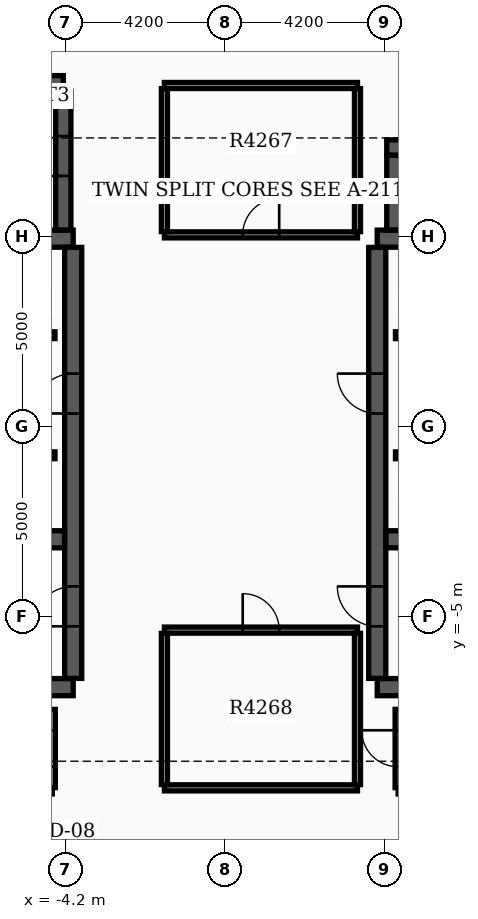
"""IFC4 building model, lengths in metres.
Left out: names, types, materials, properties, quantities, classifications, styles, units other than length and angle.
Written with IfcOpenShell. Run it as: python <this file> out.ifc"""

import sys

from ifc_helpers import new_model, si_unit, direction, frame, frame_2d, origin, place, context, subcontext, project, spatial, rectangle, extrude, element, fill, save


model = new_model("IFC4")
c1 = context("Model", 3, precision=1e-05, world=origin(), true_north=direction((0.0, 1.0)))
c2 = subcontext(c1, "Body", "Model", "MODEL_VIEW")
j1 = project(units=[si_unit("LENGTHUNIT", "METRE"), si_unit("PLANEANGLEUNIT", "RADIAN")], contexts=[c1])
p1 = place(None, origin())
s1 = spatial("IfcSite", under=j1, at=p1, CompositionType="ELEMENT")
p2 = place(p1, origin())
s2 = spatial("IfcBuilding", under=s1, at=p2, CompositionType="ELEMENT")
p3 = place(p2, frame((0.0, 0.0, 269.4)))
s3 = spatial("IfcBuildingStorey", under=s2, at=p3, CompositionType="ELEMENT", Elevation=269.4)
for number, where, z_axis, x_axis in (
    (1, (-12.4, -6.85, 0.0), (0.0, 0.0, 1.0), (1.0, 0.0, 0.0)),
    (2, (-12.4, 4.95, 0.0), (0.0, 0.0, 1.0), (1.0, 0.0, 0.0)),
):
    element("IfcWall", number, at=place(p3, frame(where, z_axis=z_axis, x_axis=x_axis)), inside=s3, PredefinedType="SHEAR", context=c2, shape_type="SweptSolid", body=[
        extrude(rectangle(XDim=8.4, YDim=0.45, at=frame_2d((4.2, 0.0))), origin(), (0.0, 0.0, 1.0), 3.7),
    ])
p4 = place(p3, frame((-4.0, -6.62, 0.0), z_axis=(0.0, 0.0, 1.0), x_axis=(0.0, 1.0, 0.0)))
e3 = element("IfcWall", 3, at=p4, inside=s3, PredefinedType="SHEAR", context=c2, shape_type="SweptSolid", body=[
    extrude(rectangle(XDim=11.34, YDim=0.45, at=frame_2d((5.67, 0.0))), origin(), (0.0, 0.0, 1.0), 3.7),
])
p5 = place(p4, frame((1.37, 0.0, 0.0)))
e4 = element("IfcOpeningElement", 4, at=p5, cuts=e3, PredefinedType="OPENING", context=c2, shape_type="SweptSolid", body=[
    extrude(rectangle(XDim=1.05, YDim=2.15, at=frame_2d((0.525, 1.075))), frame((0.0, 0.235, 0.0), z_axis=(0.0, -1.0, 0.0), x_axis=(1.0, 0.0, 0.0)), (0.0, 0.0, 1.0), 0.47),
])
p6 = place(p4, frame((6.97, 0.0, 0.0)))
e5 = element("IfcOpeningElement", 5, at=p6, cuts=e3, PredefinedType="OPENING", context=c2, shape_type="SweptSolid", body=[
    extrude(rectangle(XDim=1.05, YDim=2.15, at=frame_2d((0.525, 1.075))), frame((0.0, 0.235, 0.0), z_axis=(0.0, -1.0, 0.0), x_axis=(1.0, 0.0, 0.0)), (0.0, 0.0, 1.0), 0.47),
])
p7 = place(p3, frame((-12.17, -2.96, 0.0), z_axis=(0.0, 0.0, 1.0), x_axis=(1.0, 0.0, 0.0)))
e6 = element("IfcWall", 6, at=p7, inside=s3, PredefinedType="SHEAR", context=c2, shape_type="SweptSolid", body=[
    extrude(rectangle(XDim=7.94, YDim=0.45, at=frame_2d((3.97, 0.0))), origin(), (0.0, 0.0, 1.0), 3.7),
])
for number, where, z_axis, x_axis in (
    (7, (4.0, -6.85, 0.0), (0.0, 0.0, 1.0), (1.0, 0.0, 0.0)),
    (8, (4.0, 4.95, 0.0), (0.0, 0.0, 1.0), (1.0, 0.0, 0.0)),
):
    element("IfcWall", number, at=place(p3, frame(where, z_axis=z_axis, x_axis=x_axis)), inside=s3, PredefinedType="SHEAR", context=c2, shape_type="SweptSolid", body=[
        extrude(rectangle(XDim=8.4, YDim=0.45, at=frame_2d((4.2, 0.0))), origin(), (0.0, 0.0, 1.0), 3.7),
    ])
p8 = place(p3, frame((4.0, -6.62, 0.0), z_axis=(0.0, 0.0, 1.0), x_axis=(0.0, 1.0, 0.0)))
e9 = element("IfcWall", 9, at=p8, inside=s3, PredefinedType="SHEAR", context=c2, shape_type="SweptSolid", body=[
    extrude(rectangle(XDim=11.34, YDim=0.45, at=frame_2d((5.67, 0.0))), origin(), (0.0, 0.0, 1.0), 3.7),
])
p9 = place(p8, frame((1.37, 0.0, 0.0)))
e10 = element("IfcOpeningElement", 10, at=p9, cuts=e9, PredefinedType="OPENING", context=c2, shape_type="SweptSolid", body=[
    extrude(rectangle(XDim=1.05, YDim=2.15, at=frame_2d((0.525, 1.075))), frame((0.0, 0.235, 0.0), z_axis=(0.0, -1.0, 0.0), x_axis=(1.0, 0.0, 0.0)), (0.0, 0.0, 1.0), 0.47),
])
p10 = place(p8, frame((6.97, 0.0, 0.0)))
e11 = element("IfcOpeningElement", 11, at=p10, cuts=e9, PredefinedType="OPENING", context=c2, shape_type="SweptSolid", body=[
    extrude(rectangle(XDim=1.05, YDim=2.15, at=frame_2d((0.525, 1.075))), frame((0.0, 0.235, 0.0), z_axis=(0.0, -1.0, 0.0), x_axis=(1.0, 0.0, 0.0)), (0.0, 0.0, 1.0), 0.47),
])
p11 = place(p3, frame((4.23, -2.96, 0.0), z_axis=(0.0, 0.0, 1.0), x_axis=(1.0, 0.0, 0.0)))
e12 = element("IfcWall", 12, at=p11, inside=s3, PredefinedType="SHEAR", context=c2, shape_type="SweptSolid", body=[
    extrude(rectangle(XDim=7.94, YDim=0.45, at=frame_2d((3.97, 0.0))), origin(), (0.0, 0.0, 1.0), 3.7),
])
p12 = place(p3, frame((-12.22, 9.04, 0.0), z_axis=(0.0, 0.0, 1.0), x_axis=(1.0, 0.0, 0.0)))
e13 = element("IfcWall", 13, at=p12, inside=s3, PredefinedType="SHEAR", context=c2, shape_type="SweptSolid", body=[
    extrude(rectangle(XDim=7.96, YDim=0.4, at=frame_2d((3.98, 0.0))), origin(), (0.0, 0.0, 1.0), 3.7),
])
p13 = place(p3, frame((-4.26, 5.18, 0.0), z_axis=(0.0, 0.0, 1.0), x_axis=(0.0, 1.0, 0.0)))
e14 = element("IfcWall", 14, at=p13, inside=s3, PredefinedType="SHEAR", context=c2, shape_type="SweptSolid", body=[
    extrude(rectangle(XDim=3.655, YDim=0.4, at=frame_2d((1.828, 0.0))), origin(), (0.0, 0.0, 1.0), 3.7),
])
p14 = place(p13, frame((1.42, 0.0, 0.0)))
e15 = element("IfcOpeningElement", 15, at=p14, cuts=e14, PredefinedType="OPENING", context=c2, shape_type="SweptSolid", body=[
    extrude(rectangle(XDim=1.05, YDim=2.15, at=frame_2d((0.525, 1.075))), frame((0.0, 0.21, 0.0), z_axis=(0.0, -1.0, 0.0), x_axis=(1.0, 0.0, 0.0)), (0.0, 0.0, 1.0), 0.42),
])
p15 = place(p3, frame((4.45, 5.18, 0.0), z_axis=(0.0, 0.0, 1.0), x_axis=(0.0, 1.0, 0.0)))
e16 = element("IfcWall", 16, at=p15, inside=s3, PredefinedType="SHEAR", context=c2, shape_type="SweptSolid", body=[
    extrude(rectangle(XDim=1.96, YDim=0.4, at=frame_2d((0.98, 0.0))), origin(), (0.0, 0.0, 1.0), 3.7),
])
p16 = place(p3, frame((4.25, 7.35, 0.0), z_axis=(0.0, 0.0, 1.0), x_axis=(1.0, 0.0, 0.0)))
e17 = element("IfcWall", 17, at=p16, inside=s3, PredefinedType="SHEAR", context=c2, shape_type="SweptSolid", body=[
    extrude(rectangle(XDim=5.4, YDim=0.4, at=frame_2d((2.7, 0.0))), origin(), (0.0, 0.0, 1.0), 3.7),
])
p17 = place(p3, frame((-11.9, 2.41, 0.0), z_axis=(0.0, 0.0, 1.0), x_axis=(1.0, 0.0, 0.0)))
e18 = element("IfcWall", 18, at=p17, inside=s3, PredefinedType="SOLIDWALL", context=c2, shape_type="SweptSolid", body=[
    extrude(rectangle(XDim=7.42, YDim=0.18, at=frame_2d((3.71, 0.0))), origin(), (0.0, 0.0, 1.0), 3.17),
])
p18 = place(p17, frame((0.55, 0.0, 0.0)))
e19 = element("IfcOpeningElement", 19, at=p18, cuts=e18, PredefinedType="OPENING", context=c2, shape_type="SweptSolid", body=[
    extrude(rectangle(XDim=1.1, YDim=2.15, at=frame_2d((0.55, 1.075))), frame((0.0, 0.1, 0.0), z_axis=(0.0, -1.0, 0.0), x_axis=(1.0, 0.0, 0.0)), (0.0, 0.0, 1.0), 0.2),
])
p19 = place(p17, frame((4.9, 0.0, 0.0)))
e20 = element("IfcOpeningElement", 20, at=p19, cuts=e18, PredefinedType="OPENING", context=c2, shape_type="SweptSolid", body=[
    extrude(rectangle(XDim=0.88, YDim=2.1, at=frame_2d((0.44, 1.05))), frame((0.0, 0.1, 0.0), z_axis=(0.0, -1.0, 0.0), x_axis=(1.0, 0.0, 0.0)), (0.0, 0.0, 1.0), 0.2),
])
p20 = place(p3, frame((4.48, 2.41, 0.0), z_axis=(0.0, 0.0, 1.0), x_axis=(1.0, 0.0, 0.0)))
e21 = element("IfcWall", 21, at=p20, inside=s3, PredefinedType="SOLIDWALL", context=c2, shape_type="SweptSolid", body=[
    extrude(rectangle(XDim=7.42, YDim=0.18, at=frame_2d((3.71, 0.0))), origin(), (0.0, 0.0, 1.0), 3.17),
])
p21 = place(p20, frame((5.67, 0.0, 0.0)))
e22 = element("IfcOpeningElement", 22, at=p21, cuts=e21, PredefinedType="OPENING", context=c2, shape_type="SweptSolid", body=[
    extrude(rectangle(XDim=1.1, YDim=2.15, at=frame_2d((0.55, 1.075))), frame((0.0, 0.1, 0.0), z_axis=(0.0, -1.0, 0.0), x_axis=(1.0, 0.0, 0.0)), (0.0, 0.0, 1.0), 0.2),
])
p22 = place(p20, frame((1.6, 0.0, 0.0)))
e23 = element("IfcOpeningElement", 23, at=p22, cuts=e21, PredefinedType="OPENING", context=c2, shape_type="SweptSolid", body=[
    extrude(rectangle(XDim=0.88, YDim=2.1, at=frame_2d((0.44, 1.05))), frame((0.0, 0.1, 0.0), z_axis=(0.0, -1.0, 0.0), x_axis=(1.0, 0.0, 0.0)), (0.0, 0.0, 1.0), 0.2),
])
p23 = place(p3, frame((-11.9, -0.75, 0.0), z_axis=(0.0, 0.0, 1.0), x_axis=(1.0, 0.0, 0.0)))
e24 = element("IfcWall", 24, at=p23, inside=s3, PredefinedType="SOLIDWALL", context=c2, shape_type="SweptSolid", body=[
    extrude(rectangle(XDim=7.42, YDim=0.18, at=frame_2d((3.71, 0.0))), origin(), (0.0, 0.0, 1.0), 3.17),
])
p24 = place(p23, frame((5.75, 0.0, 0.0)))
e25 = element("IfcOpeningElement", 25, at=p24, cuts=e24, PredefinedType="OPENING", context=c2, shape_type="SweptSolid", body=[
    extrude(rectangle(XDim=1.1, YDim=2.15, at=frame_2d((0.55, 1.075))), frame((0.0, 0.1, 0.0), z_axis=(0.0, -1.0, 0.0), x_axis=(1.0, 0.0, 0.0)), (0.0, 0.0, 1.0), 0.2),
])
p25 = place(p23, frame((1.6, 0.0, 0.0)))
e26 = element("IfcOpeningElement", 26, at=p25, cuts=e24, PredefinedType="OPENING", context=c2, shape_type="SweptSolid", body=[
    extrude(rectangle(XDim=0.88, YDim=2.1, at=frame_2d((0.44, 1.05))), frame((0.0, 0.1, 0.0), z_axis=(0.0, -1.0, 0.0), x_axis=(1.0, 0.0, 0.0)), (0.0, 0.0, 1.0), 0.2),
])
p26 = place(p3, frame((4.48, -0.75, 0.0), z_axis=(0.0, 0.0, 1.0), x_axis=(1.0, 0.0, 0.0)))
e27 = element("IfcWall", 27, at=p26, inside=s3, PredefinedType="SOLIDWALL", context=c2, shape_type="SweptSolid", body=[
    extrude(rectangle(XDim=7.42, YDim=0.18, at=frame_2d((3.71, 0.0))), origin(), (0.0, 0.0, 1.0), 3.17),
])
p27 = place(p26, frame((3.92, 0.0, 0.0)))
e28 = element("IfcOpeningElement", 28, at=p27, cuts=e27, PredefinedType="OPENING", context=c2, shape_type="SweptSolid", body=[
    extrude(rectangle(XDim=1.1, YDim=2.15, at=frame_2d((0.55, 1.075))), frame((0.0, 0.1, 0.0), z_axis=(0.0, -1.0, 0.0), x_axis=(1.0, 0.0, 0.0)), (0.0, 0.0, 1.0), 0.2),
])
p28 = place(p26, frame((5.82, 0.0, 0.0)))
e29 = element("IfcOpeningElement", 29, at=p28, cuts=e27, PredefinedType="OPENING", context=c2, shape_type="SweptSolid", body=[
    extrude(rectangle(XDim=1.1, YDim=2.15, at=frame_2d((0.55, 1.075))), frame((0.0, 0.1, 0.0), z_axis=(0.0, -1.0, 0.0), x_axis=(1.0, 0.0, 0.0)), (0.0, 0.0, 1.0), 0.2),
])
p29 = place(p26, frame((1.6, 0.0, 0.0)))
e30 = element("IfcOpeningElement", 30, at=p29, cuts=e27, PredefinedType="OPENING", context=c2, shape_type="SweptSolid", body=[
    extrude(rectangle(XDim=0.88, YDim=2.1, at=frame_2d((0.44, 1.05))), frame((0.0, 0.1, 0.0), z_axis=(0.0, -1.0, 0.0), x_axis=(1.0, 0.0, 0.0)), (0.0, 0.0, 1.0), 0.2),
])
p30 = place(p3, frame((-1.6, 5.05, 0.0), z_axis=(0.0, 0.0, 1.0), x_axis=(1.0, 0.0, 0.0)))
e31 = element("IfcWall", 31, at=p30, inside=s3, PredefinedType="PARTITIONING", context=c2, shape_type="SweptSolid", body=[
    extrude(rectangle(XDim=5.08, YDim=0.16, at=frame_2d((2.54, 0.0))), origin(), (0.0, 0.0, 1.0), 3.17),
])
p31 = place(p30, frame((2.06, 0.0, 0.0)))
e32 = element("IfcOpeningElement", 32, at=p31, cuts=e31, PredefinedType="OPENING", context=c2, shape_type="SweptSolid", body=[
    extrude(rectangle(XDim=0.96, YDim=2.15, at=frame_2d((0.48, 1.075))), frame((0.0, 0.09, 0.0), z_axis=(0.0, -1.0, 0.0), x_axis=(1.0, 0.0, 0.0)), (0.0, 0.0, 1.0), 0.18),
])
p32 = place(p3, frame((-1.6, 8.98, 0.0), z_axis=(0.0, 0.0, 1.0), x_axis=(1.0, 0.0, 0.0)))
e33 = element("IfcWall", 33, at=p32, inside=s3, PredefinedType="PARTITIONING", context=c2, shape_type="SweptSolid", body=[
    extrude(rectangle(XDim=5.08, YDim=0.16, at=frame_2d((2.54, 0.0))), origin(), (0.0, 0.0, 1.0), 3.17),
])
for number, where, z_axis, x_axis in (
    (34, (-1.6, 5.135, 0.0), (0.0, 0.0, 1.0), (0.0, 1.0, 0.0)),
    (35, (3.48, 5.135, 0.0), (0.0, 0.0, 1.0), (0.0, 1.0, 0.0)),
):
    element("IfcWall", number, at=place(p3, frame(where, z_axis=z_axis, x_axis=x_axis)), inside=s3, PredefinedType="PARTITIONING", context=c2, shape_type="SweptSolid", body=[
        extrude(rectangle(XDim=3.76, YDim=0.16, at=frame_2d((1.88, 0.0))), origin(), (0.0, 0.0, 1.0), 3.17),
    ])
p33 = place(p3, frame((-1.6, -9.5, 0.0), z_axis=(0.0, 0.0, 1.0), x_axis=(1.0, 0.0, 0.0)))
e36 = element("IfcWall", 36, at=p33, inside=s3, PredefinedType="PARTITIONING", context=c2, shape_type="SweptSolid", body=[
    extrude(rectangle(XDim=5.08, YDim=0.16, at=frame_2d((2.54, 0.0))), origin(), (0.0, 0.0, 1.0), 3.17),
])
p34 = place(p3, frame((-1.6, -5.35, 0.0), z_axis=(0.0, 0.0, 1.0), x_axis=(1.0, 0.0, 0.0)))
e37 = element("IfcWall", 37, at=p34, inside=s3, PredefinedType="PARTITIONING", context=c2, shape_type="SweptSolid", body=[
    extrude(rectangle(XDim=5.08, YDim=0.16, at=frame_2d((2.54, 0.0))), origin(), (0.0, 0.0, 1.0), 3.17),
])
p35 = place(p34, frame((2.06, 0.0, 0.0)))
e38 = element("IfcOpeningElement", 38, at=p35, cuts=e37, PredefinedType="OPENING", context=c2, shape_type="SweptSolid", body=[
    extrude(rectangle(XDim=0.96, YDim=2.15, at=frame_2d((0.48, 1.075))), frame((0.0, 0.09, 0.0), z_axis=(0.0, -1.0, 0.0), x_axis=(1.0, 0.0, 0.0)), (0.0, 0.0, 1.0), 0.18),
])
for number, where, z_axis, x_axis in (
    (39, (-1.6, -9.415, 0.0), (0.0, 0.0, 1.0), (0.0, 1.0, 0.0)),
    (40, (3.48, -9.415, 0.0), (0.0, 0.0, 1.0), (0.0, 1.0, 0.0)),
):
    element("IfcWall", number, at=place(p3, frame(where, z_axis=z_axis, x_axis=x_axis)), inside=s3, PredefinedType="PARTITIONING", context=c2, shape_type="SweptSolid", body=[
        extrude(rectangle(XDim=3.98, YDim=0.16, at=frame_2d((1.99, 0.0))), origin(), (0.0, 0.0, 1.0), 3.17),
    ])
p36 = place(p3, frame((4.55, -9.58, 0.0), z_axis=(0.0, 0.0, 1.0), x_axis=(1.0, 0.0, 0.0)))
e41 = element("IfcWall", 41, at=p36, inside=s3, PredefinedType="PARTITIONING", context=c2, shape_type="SweptSolid", body=[
    extrude(rectangle(XDim=8.1, YDim=0.16, at=frame_2d((4.05, 0.0))), origin(), (0.0, 0.0, 1.0), 3.17),
])
p37 = place(p3, frame((4.55, -9.495, 0.0), z_axis=(0.0, 0.0, 1.0), x_axis=(0.0, 1.0, 0.0)))
e42 = element("IfcWall", 42, at=p37, inside=s3, PredefinedType="PARTITIONING", context=c2, shape_type="SweptSolid", body=[
    extrude(rectangle(XDim=2.06, YDim=0.16, at=frame_2d((1.03, 0.0))), origin(), (0.0, 0.0, 1.0), 3.17),
])
p38 = place(p37, frame((0.55, 0.0, 0.0)))
e43 = element("IfcOpeningElement", 43, at=p38, cuts=e42, PredefinedType="OPENING", context=c2, shape_type="SweptSolid", body=[
    extrude(rectangle(XDim=0.96, YDim=2.15, at=frame_2d((0.48, 1.075))), frame((0.0, 0.09, 0.0), z_axis=(0.0, -1.0, 0.0), x_axis=(1.0, 0.0, 0.0)), (0.0, 0.0, 1.0), 0.18),
])
p39 = place(p3, frame((-4.55, -9.495, 0.0), z_axis=(0.0, 0.0, 1.0), x_axis=(0.0, 1.0, 0.0)))
e44 = element("IfcWall", 44, at=p39, inside=s3, PredefinedType="PARTITIONING", context=c2, shape_type="SweptSolid", body=[
    extrude(rectangle(XDim=2.06, YDim=0.16, at=frame_2d((1.03, 0.0))), origin(), (0.0, 0.0, 1.0), 3.17),
])
p40 = place(p39, frame((0.55, 0.0, 0.0)))
e45 = element("IfcOpeningElement", 45, at=p40, cuts=e44, PredefinedType="OPENING", context=c2, shape_type="SweptSolid", body=[
    extrude(rectangle(XDim=0.96, YDim=2.15, at=frame_2d((0.48, 1.075))), frame((0.0, 0.09, 0.0), z_axis=(0.0, -1.0, 0.0), x_axis=(1.0, 0.0, 0.0)), (0.0, 0.0, 1.0), 0.18),
])
p41 = place(p5, origin())
e46 = element("IfcDoor", 46, at=p41, inside=s3, OperationType="SINGLE_SWING_LEFT", PredefinedType="DOOR", context=c2, shape_type="SweptSolid", body=[
    extrude(rectangle(XDim=1.05, YDim=2.15, at=frame_2d((0.525, 1.075))), frame((0.0, 0.025, 0.0), z_axis=(0.0, -1.0, 0.0), x_axis=(1.0, 0.0, 0.0)), (0.0, 0.0, 1.0), 0.05),
])
fill(e4, e46)
p42 = place(p9, origin())
e47 = element("IfcDoor", 47, at=p42, inside=s3, OperationType="SINGLE_SWING_RIGHT", PredefinedType="DOOR", context=c2, shape_type="SweptSolid", body=[
    extrude(rectangle(XDim=1.05, YDim=2.15, at=frame_2d((0.525, 1.075))), frame((0.0, 0.025, 0.0), z_axis=(0.0, -1.0, 0.0), x_axis=(1.0, 0.0, 0.0)), (0.0, 0.0, 1.0), 0.05),
])
fill(e10, e47)
p43 = place(p6, origin())
e48 = element("IfcDoor", 48, at=p43, inside=s3, OperationType="SINGLE_SWING_LEFT", PredefinedType="DOOR", context=c2, shape_type="SweptSolid", body=[
    extrude(rectangle(XDim=1.05, YDim=2.15, at=frame_2d((0.525, 1.075))), frame((0.0, 0.025, 0.0), z_axis=(0.0, -1.0, 0.0), x_axis=(1.0, 0.0, 0.0)), (0.0, 0.0, 1.0), 0.05),
])
fill(e5, e48)
p44 = place(p10, origin())
e49 = element("IfcDoor", 49, at=p44, inside=s3, OperationType="SINGLE_SWING_RIGHT", PredefinedType="DOOR", context=c2, shape_type="SweptSolid", body=[
    extrude(rectangle(XDim=1.05, YDim=2.15, at=frame_2d((0.525, 1.075))), frame((0.0, 0.025, 0.0), z_axis=(0.0, -1.0, 0.0), x_axis=(1.0, 0.0, 0.0)), (0.0, 0.0, 1.0), 0.05),
])
fill(e11, e49)
p45 = place(p14, origin())
e50 = element("IfcDoor", 50, at=p45, inside=s3, OperationType="SINGLE_SWING_LEFT", PredefinedType="DOOR", context=c2, shape_type="SweptSolid", body=[
    extrude(rectangle(XDim=1.05, YDim=2.15, at=frame_2d((0.525, 1.075))), frame((0.0, 0.025, 0.0), z_axis=(0.0, -1.0, 0.0), x_axis=(1.0, 0.0, 0.0)), (0.0, 0.0, 1.0), 0.05),
])
fill(e15, e50)
p46 = place(p31, origin())
e51 = element("IfcDoor", 51, at=p46, inside=s3, OperationType="SINGLE_SWING_RIGHT", PredefinedType="DOOR", context=c2, shape_type="SweptSolid", body=[
    extrude(rectangle(XDim=0.96, YDim=2.15, at=frame_2d((0.48, 1.075))), frame((0.0, 0.025, 0.0), z_axis=(0.0, -1.0, 0.0), x_axis=(1.0, 0.0, 0.0)), (0.0, 0.0, 1.0), 0.05),
])
fill(e32, e51)
p47 = place(p35, origin())
e52 = element("IfcDoor", 52, at=p47, inside=s3, OperationType="SINGLE_SWING_LEFT", PredefinedType="DOOR", context=c2, shape_type="SweptSolid", body=[
    extrude(rectangle(XDim=0.96, YDim=2.15, at=frame_2d((0.48, 1.075))), frame((0.0, 0.025, 0.0), z_axis=(0.0, -1.0, 0.0), x_axis=(1.0, 0.0, 0.0)), (0.0, 0.0, 1.0), 0.05),
])
fill(e38, e52)
p48 = place(p38, origin())
e53 = element("IfcDoor", 53, at=p48, inside=s3, OperationType="SINGLE_SWING_RIGHT", PredefinedType="DOOR", context=c2, shape_type="SweptSolid", body=[
    extrude(rectangle(XDim=0.96, YDim=2.15, at=frame_2d((0.48, 1.075))), frame((0.0, 0.025, 0.0), z_axis=(0.0, -1.0, 0.0), x_axis=(1.0, 0.0, 0.0)), (0.0, 0.0, 1.0), 0.05),
])
fill(e43, e53)
p49 = place(p40, origin())
e54 = element("IfcDoor", 54, at=p49, inside=s3, OperationType="SINGLE_SWING_LEFT", PredefinedType="DOOR", context=c2, shape_type="SweptSolid", body=[
    extrude(rectangle(XDim=0.96, YDim=2.15, at=frame_2d((0.48, 1.075))), frame((0.0, 0.025, 0.0), z_axis=(0.0, -1.0, 0.0), x_axis=(1.0, 0.0, 0.0)), (0.0, 0.0, 1.0), 0.05),
])
fill(e45, e54)
save(model, sys.argv[1])
